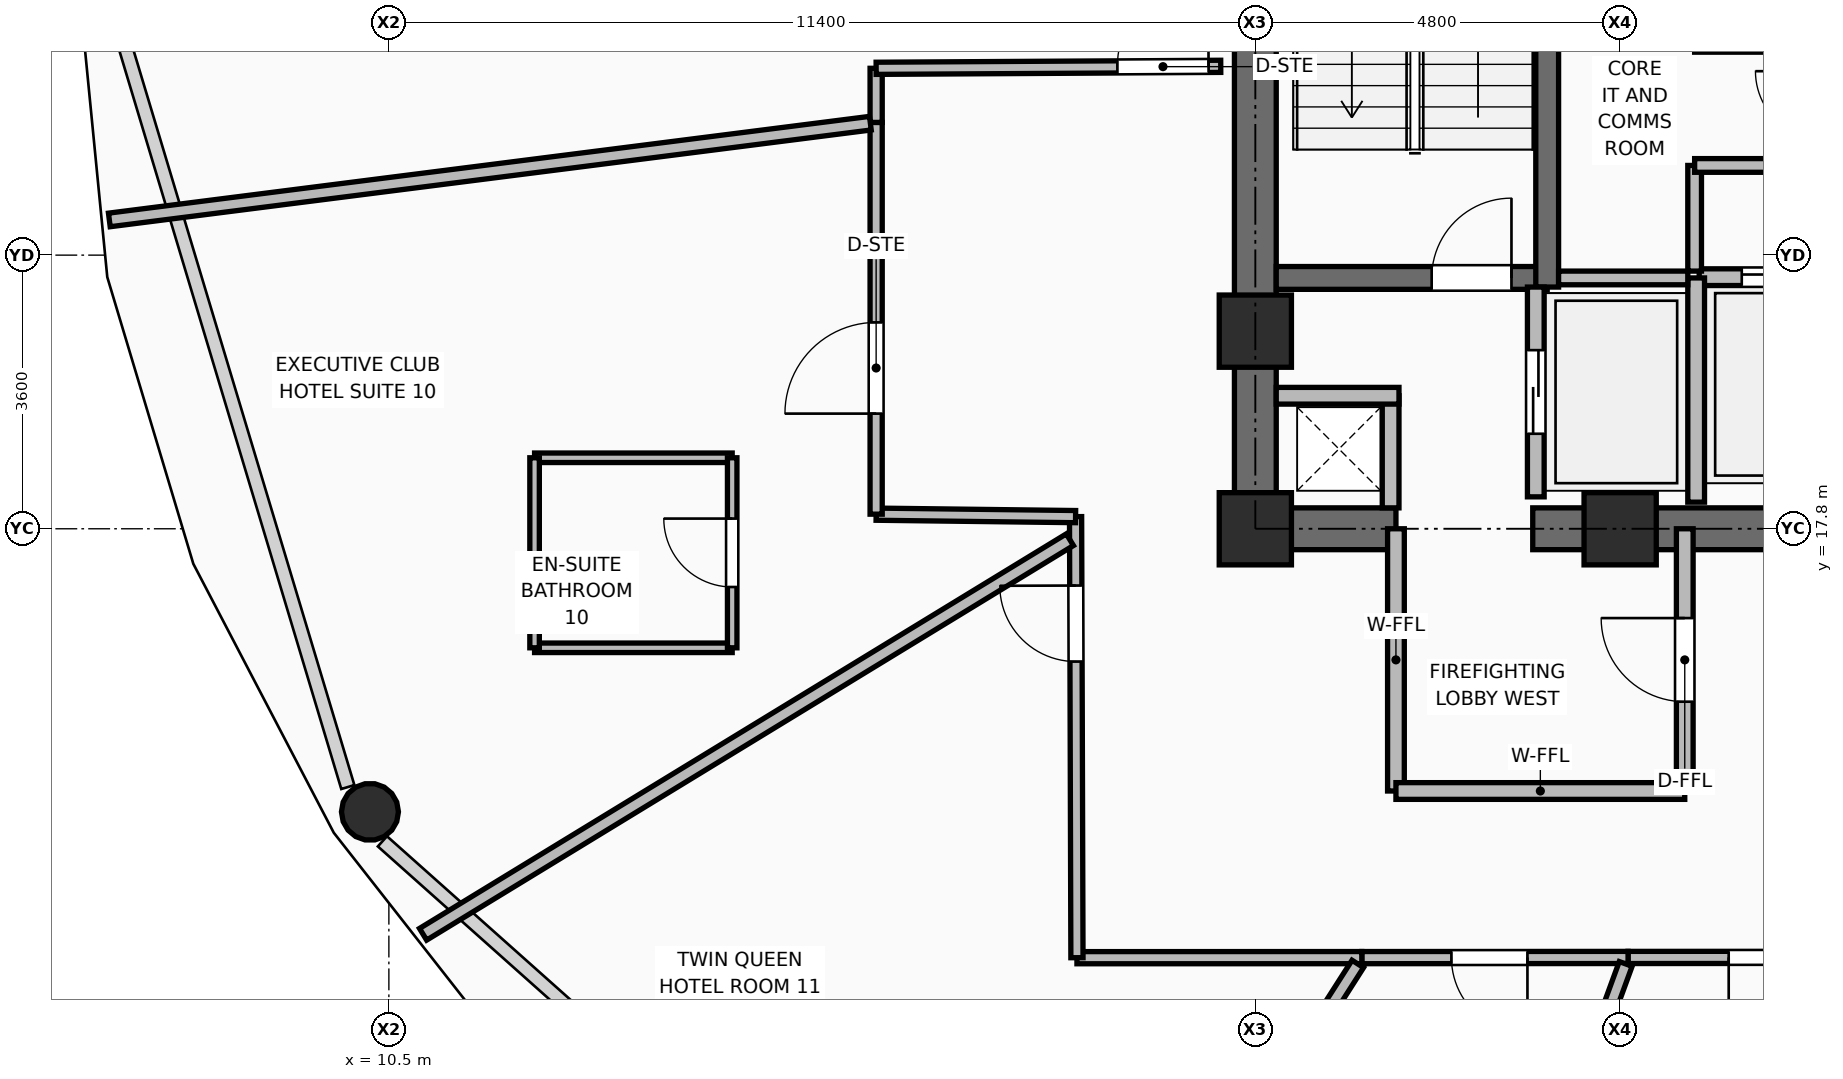
"""IFC4 building model, lengths in metres.
Left out: names, types, materials, properties, quantities, classifications, styles, units other than length and angle.
Written with IfcOpenShell. Run it as: python <this file> out.ifc"""

import sys

from ifc_helpers import new_model, si_unit, direction, frame, frame_2d, origin, origin_2d, place, context, subcontext, project, spatial, rectangle, hollow_circle, extrude, element, fill, save


model = new_model("IFC4")
c1 = context("Model", 3, precision=1e-05, world=origin(), true_north=direction((0.0, 1.0)))
c2 = subcontext(c1, "Body", "Model", "MODEL_VIEW")
j1 = project(units=[si_unit("LENGTHUNIT", "METRE"), si_unit("PLANEANGLEUNIT", "RADIAN")], contexts=[c1])
p1 = place(None, origin())
s1 = spatial("IfcSite", under=j1, at=p1, CompositionType="ELEMENT")
p2 = place(p1, origin())
s2 = spatial("IfcBuilding", under=s1, at=p2, CompositionType="ELEMENT")
p3 = place(p2, frame((0.0, 0.0, 172.2)))
s3 = spatial("IfcBuildingStorey", under=s2, at=p3, CompositionType="ELEMENT", Elevation=172.2)
for number, where, z_axis, x_axis in (
    (1, (21.9, 17.8, 0.0), (0.0, 0.0, 1.0), (1.0, 0.0, 0.0)),
    (2, (26.7, 17.8, 0.0), (0.0, 0.0, 1.0), (1.0, 0.0, 0.0)),
    (3, (21.9, 20.4, 0.0), (0.0, 0.0, 1.0), (1.0, 0.0, 0.0)),
):
    element("IfcColumn", number, at=place(p3, frame(where, z_axis=z_axis, x_axis=x_axis)), inside=s3, PredefinedType="COLUMN", context=c2, shape_type="SweptSolid", body=[
        extrude(rectangle(XDim=0.95, YDim=0.95, at=origin_2d()), origin(), (0.0, 0.0, 1.0), 3.75),
    ])
p4 = place(p3, frame((10.251, 14.076, 0.0), z_axis=(0.045976334235, 0.023684778242, 0.998661708473), x_axis=(-0.457956589674, 0.888974556427, 0.0)))
e4 = element("IfcColumn", 4, at=p4, inside=s3, PredefinedType="COLUMN", context=c2, shape_type="SweptSolid", body=[
    extrude(hollow_circle(Radius=0.375, WallThickness=0.035, at=origin_2d()), origin(), (0.0, 0.0, 1.0), 3.505),
])
p5 = place(p3, frame((21.625, 17.8, 0.0), z_axis=(0.0, 0.0, 1.0), x_axis=(1.0, 0.0, 0.0)))
e5 = element("IfcWall", 5, at=p5, inside=s3, PredefinedType="SHEAR", context=c2, shape_type="SweptSolid", body=[
    extrude(rectangle(XDim=2.125, YDim=0.55, at=frame_2d((1.062, 0.0))), origin(), (0.0, 0.0, 1.0), 3.5),
])
p6 = place(p3, frame((25.55, 17.8, 0.0), z_axis=(0.0, 0.0, 1.0), x_axis=(1.0, 0.0, 0.0)))
e6 = element("IfcWall", 6, at=p6, inside=s3, PredefinedType="SHEAR", context=c2, shape_type="SweptSolid", body=[
    extrude(rectangle(XDim=6.9, YDim=0.55, at=frame_2d((3.45, 0.0))), origin(), (0.0, 0.0, 1.0), 3.5),
])
p7 = place(p3, frame((21.9, 18.075, 0.0), z_axis=(0.0, 0.0, 1.0), x_axis=(0.0, 1.0, 0.0)))
e7 = element("IfcWall", 7, at=p7, inside=s3, PredefinedType="SHEAR", context=c2, shape_type="SweptSolid", body=[
    extrude(rectangle(XDim=14.1, YDim=0.55, at=frame_2d((7.05, 0.0))), origin(), (0.0, 0.0, 1.0), 3.5),
])
p8 = place(p3, frame((22.175, 21.1, 0.0), z_axis=(0.0, 0.0, 1.0), x_axis=(1.0, 0.0, 0.0)))
e8 = element("IfcWall", 8, at=p8, inside=s3, PredefinedType="SHEAR", context=c2, shape_type="SweptSolid", body=[
    extrude(rectangle(XDim=3.565, YDim=0.3, at=frame_2d((1.782, 0.0))), origin(), (0.0, 0.0, 1.0), 3.5),
])
p9 = place(p8, frame((2.045, 0.0, 0.0)))
e9 = element("IfcOpeningElement", 9, at=p9, cuts=e8, PredefinedType="OPENING", context=c2, shape_type="SweptSolid", body=[
    extrude(rectangle(XDim=1.05, YDim=2.1, at=frame_2d((0.525, 1.05))), frame((0.0, 0.16, 0.0), z_axis=(0.0, -1.0, 0.0), x_axis=(1.0, 0.0, 0.0)), (0.0, 0.0, 1.0), 0.32),
])
p10 = place(p3, frame((25.74, 20.98, 0.0), z_axis=(0.0, 0.0, 1.0), x_axis=(0.0, 1.0, 0.0)))
e10 = element("IfcWall", 10, at=p10, inside=s3, PredefinedType="SHEAR", context=c2, shape_type="SweptSolid", body=[
    extrude(rectangle(XDim=7.99, YDim=0.3, at=frame_2d((3.995, 0.0))), origin(), (0.0, 0.0, 1.0), 3.5),
])
p11 = place(p3, frame((23.68, 18.075, 0.0), z_axis=(0.0, 0.0, 1.0), x_axis=(0.0, 1.0, 0.0)))
e11 = element("IfcWall", 11, at=p11, inside=s3, PredefinedType="PARTITIONING", context=c2, shape_type="SweptSolid", body=[
    extrude(rectangle(XDim=1.475, YDim=0.22, at=frame_2d((0.738, 0.0))), origin(), (0.0, 0.0, 1.0), 3.48),
])
p12 = place(p3, frame((22.175, 19.55, 0.0), z_axis=(0.0, 0.0, 1.0), x_axis=(1.0, 0.0, 0.0)))
e12 = element("IfcWall", 12, at=p12, inside=s3, PredefinedType="PARTITIONING", context=c2, shape_type="SweptSolid", body=[
    extrude(rectangle(XDim=1.615, YDim=0.22, at=frame_2d((0.808, 0.0))), origin(), (0.0, 0.0, 1.0), 2.525),
])
p13 = place(p3, frame((25.59, 18.22, 0.0), z_axis=(0.0, 0.0, 1.0), x_axis=(0.0, 1.0, 0.0)))
e13 = element("IfcWall", 13, at=p13, inside=s3, PredefinedType="PARTITIONING", context=c2, shape_type="SweptSolid", body=[
    extrude(rectangle(XDim=2.76, YDim=0.22, at=frame_2d((1.38, 0.0))), origin(), (0.0, 0.0, 1.0), 3.48),
])
p14 = place(p13, frame((0.83, 0.0, 0.0)))
e14 = element("IfcOpeningElement", 14, at=p14, cuts=e13, PredefinedType="OPENING", context=c2, shape_type="SweptSolid", body=[
    extrude(rectangle(XDim=1.1, YDim=2.2, at=frame_2d((0.55, 1.1))), frame((0.0, 0.12, 0.0), z_axis=(0.0, -1.0, 0.0), x_axis=(1.0, 0.0, 0.0)), (0.0, 0.0, 1.0), 0.24),
])
p15 = place(p3, frame((27.74, 21.11, 0.0), z_axis=(0.0, 0.0, 1.0), x_axis=(1.0, 0.0, 0.0)))
e15 = element("IfcWall", 15, at=p15, inside=s3, PredefinedType="PARTITIONING", context=c2, shape_type="SweptSolid", body=[
    extrude(rectangle(XDim=2.22, YDim=0.22, at=frame_2d((1.11, 0.0))), origin(), (0.0, 0.0, 1.0), 3.48),
])
p16 = place(p15, frame((0.56, 0.0, 0.0)))
e16 = element("IfcOpeningElement", 16, at=p16, cuts=e15, PredefinedType="OPENING", context=c2, shape_type="SweptSolid", body=[
    extrude(rectangle(XDim=1.1, YDim=2.2, at=frame_2d((0.55, 1.1))), frame((0.0, 0.12, 0.0), z_axis=(0.0, -1.0, 0.0), x_axis=(1.0, 0.0, 0.0)), (0.0, 0.0, 1.0), 0.24),
])
p17 = place(p3, frame((27.7, 18.15, 0.0), z_axis=(0.0, 0.0, 1.0), x_axis=(0.0, 1.0, 0.0)))
e17 = element("IfcWall", 17, at=p17, inside=s3, PredefinedType="PARTITIONING", context=c2, shape_type="SweptSolid", body=[
    extrude(rectangle(XDim=2.95, YDim=0.22, at=frame_2d((1.475, 0.0))), origin(), (0.0, 0.0, 1.0), 3.48),
])
p18 = place(p3, frame((25.89, 21.1, 0.0), z_axis=(0.0, 0.0, 1.0), x_axis=(1.0, 0.0, 0.0)))
e18 = element("IfcWall", 18, at=p18, inside=s3, PredefinedType="PARTITIONING", context=c2, shape_type="SweptSolid", body=[
    extrude(rectangle(XDim=1.7, YDim=0.18, at=frame_2d((0.85, 0.0))), origin(), (0.0, 0.0, 1.0), 3.48),
])
p19 = place(p3, frame((27.68, 21.19, 0.0), z_axis=(0.0, 0.0, 1.0), x_axis=(0.0, 1.0, 0.0)))
e19 = element("IfcWall", 19, at=p19, inside=s3, PredefinedType="PARTITIONING", context=c2, shape_type="SweptSolid", body=[
    extrude(rectangle(XDim=1.39, YDim=0.18, at=frame_2d((0.695, 0.0))), origin(), (0.0, 0.0, 1.0), 3.48),
])
p20 = place(p3, frame((27.68, 22.58, 0.0), z_axis=(0.0, 0.0, 1.0), x_axis=(1.0, 0.0, 0.0)))
e20 = element("IfcWall", 20, at=p20, inside=s3, PredefinedType="PARTITIONING", context=c2, shape_type="SweptSolid", body=[
    extrude(rectangle(XDim=1.7, YDim=0.18, at=frame_2d((0.85, 0.0))), origin(), (0.0, 0.0, 1.0), 3.48),
])
p21 = place(p3, frame((23.75, 14.35, 0.0), z_axis=(0.0, 0.0, 1.0), x_axis=(0.0, 1.0, 0.0)))
e21 = element("IfcWall", 21, at=p21, inside=s3, PredefinedType="PARTITIONING", context=c2, shape_type="SweptSolid", body=[
    extrude(rectangle(XDim=3.45, YDim=0.22, at=frame_2d((1.725, 0.0))), origin(), (0.0, 0.0, 1.0), 2.936),
])
p22 = place(p3, frame((23.75, 14.35, 0.0), z_axis=(0.0, 0.0, 1.0), x_axis=(1.0, 0.0, 0.0)))
e22 = element("IfcWall", 22, at=p22, inside=s3, PredefinedType="PARTITIONING", context=c2, shape_type="SweptSolid", body=[
    extrude(rectangle(XDim=3.8, YDim=0.22, at=frame_2d((1.9, 0.0))), origin(), (0.0, 0.0, 1.0), 3.48),
])
p23 = place(p3, frame((27.55, 14.35, 0.0), z_axis=(0.0, 0.0, 1.0), x_axis=(0.0, 1.0, 0.0)))
e23 = element("IfcWall", 23, at=p23, inside=s3, PredefinedType="PARTITIONING", context=c2, shape_type="SweptSolid", body=[
    extrude(rectangle(XDim=3.45, YDim=0.22, at=frame_2d((1.725, 0.0))), origin(), (0.0, 0.0, 1.0), 2.936),
])
p24 = place(p23, frame((1.175, 0.0, 0.0)))
e24 = element("IfcOpeningElement", 24, at=p24, cuts=e23, PredefinedType="OPENING", context=c2, shape_type="SweptSolid", body=[
    extrude(rectangle(XDim=1.1, YDim=2.1, at=frame_2d((0.55, 1.05))), frame((0.0, 0.12, 0.0), z_axis=(0.0, -1.0, 0.0), x_axis=(1.0, 0.0, 0.0)), (0.0, 0.0, 1.0), 0.24),
])
p25 = place(p3, frame((30.507, 12.162, 0.0), z_axis=(0.0, 0.0, 1.0), x_axis=(-0.999999823965, -0.000593354326, 0.0)))
e25 = element("IfcWall", 25, at=p25, inside=s3, PredefinedType="PARTITIONING", context=c2, shape_type="SweptSolid", body=[
    extrude(rectangle(XDim=3.703, YDim=0.16, at=frame_2d((1.852, 0.0))), origin(), (0.0, 0.0, 1.0), 3.48),
])
p26 = place(p25, frame((1.179, 0.0, 0.0)))
e26 = element("IfcOpeningElement", 26, at=p26, cuts=e25, PredefinedType="OPENING", context=c2, shape_type="SweptSolid", body=[
    extrude(rectangle(XDim=1.2, YDim=2.1, at=frame_2d((0.6, 1.05))), frame((0.0, 0.09, 0.0), z_axis=(0.0, -1.0, 0.0), x_axis=(1.0, 0.0, 0.0)), (0.0, 0.0, 1.0), 0.18),
])
p27 = place(p3, frame((26.804, 12.16, 0.0), z_axis=(0.0, 0.0, 1.0), x_axis=(-0.999999844558, -0.000557568912, 0.0)))
e27 = element("IfcWall", 27, at=p27, inside=s3, PredefinedType="PARTITIONING", context=c2, shape_type="SweptSolid", body=[
    extrude(rectangle(XDim=3.503, YDim=0.16, at=frame_2d((1.751, 0.0))), origin(), (0.0, 0.0, 1.0), 3.48),
])
p28 = place(p27, frame((1.324, 0.0, 0.0)))
e28 = element("IfcOpeningElement", 28, at=p28, cuts=e27, PredefinedType="OPENING", context=c2, shape_type="SweptSolid", body=[
    extrude(rectangle(XDim=1.0, YDim=2.1, at=frame_2d((0.5, 1.05))), frame((0.0, 0.09, 0.0), z_axis=(0.0, -1.0, 0.0), x_axis=(1.0, 0.0, 0.0)), (0.0, 0.0, 1.0), 0.18),
])
p29 = place(p3, frame((23.301, 12.158, 0.0), z_axis=(0.0, 0.0, 1.0), x_axis=(-0.999999966056, -0.000260552362, 0.0)))
e29 = element("IfcWall", 29, at=p29, inside=s3, PredefinedType="PARTITIONING", context=c2, shape_type="SweptSolid", body=[
    extrude(rectangle(XDim=3.748, YDim=0.16, at=frame_2d((1.874, 0.0))), origin(), (0.0, 0.0, 1.0), 2.936),
])
p30 = place(p3, frame((19.553, 12.157, 0.0), z_axis=(0.0, 0.0, 1.0), x_axis=(-0.003113283747, 0.99999515372, 0.0)))
e30 = element("IfcWall", 30, at=p30, inside=s3, PredefinedType="PARTITIONING", context=c2, shape_type="SweptSolid", body=[
    extrude(rectangle(XDim=5.803, YDim=0.16, at=frame_2d((2.901, 0.0))), origin(), (0.0, 0.0, 1.0), 2.936),
])
p31 = place(p30, frame((3.896, 0.0, 0.0)))
e31 = element("IfcOpeningElement", 31, at=p31, cuts=e30, PredefinedType="OPENING", context=c2, shape_type="SweptSolid", body=[
    extrude(rectangle(XDim=1.0, YDim=2.1, at=frame_2d((0.5, 1.05))), frame((0.0, 0.09, 0.0), z_axis=(0.0, -1.0, 0.0), x_axis=(1.0, 0.0, 0.0)), (0.0, 0.0, 1.0), 0.18),
])
p32 = place(p3, frame((19.535, 17.96, 0.0), z_axis=(0.0, 0.0, 1.0), x_axis=(-0.999925730774, 0.012187408888, 0.0)))
e32 = element("IfcWall", 32, at=p32, inside=s3, PredefinedType="PARTITIONING", context=c2, shape_type="SweptSolid", body=[
    extrude(rectangle(XDim=2.624, YDim=0.16, at=frame_2d((1.312, 0.0))), origin(), (0.0, 0.0, 1.0), 3.48),
])
p33 = place(p3, frame((16.911, 17.992, 0.0), z_axis=(0.0, 0.0, 1.0), x_axis=(0.0, 1.0, 0.0)))
e33 = element("IfcWall", 33, at=p33, inside=s3, PredefinedType="PARTITIONING", context=c2, shape_type="SweptSolid", body=[
    extrude(rectangle(XDim=5.154, YDim=0.16, at=frame_2d((2.577, 0.0))), origin(), (0.0, 0.0, 1.0), 2.936),
])
p34 = place(p33, frame((1.323, 0.0, 0.0)))
e34 = element("IfcOpeningElement", 34, at=p34, cuts=e33, PredefinedType="OPENING", context=c2, shape_type="SweptSolid", body=[
    extrude(rectangle(XDim=1.2, YDim=2.1, at=frame_2d((0.6, 1.05))), frame((0.0, 0.09, 0.0), z_axis=(0.0, -1.0, 0.0), x_axis=(1.0, 0.0, 0.0)), (0.0, 0.0, 1.0), 0.18),
])
p35 = place(p3, frame((16.911, 23.146, 0.0), z_axis=(0.0, 0.0, 1.0), x_axis=(0.0, 1.0, 0.0)))
e35 = element("IfcWall", 35, at=p35, inside=s3, PredefinedType="PARTITIONING", context=c2, shape_type="SweptSolid", body=[
    extrude(rectangle(XDim=0.712, YDim=0.16, at=frame_2d((0.356, 0.0))), origin(), (0.0, 0.0, 1.0), 3.48),
])
p36 = place(p3, frame((16.911, 23.858, 0.0), z_axis=(0.0, 0.0, 1.0), x_axis=(0.999983403772, 0.005761265572, 0.0)))
e36 = element("IfcWall", 36, at=p36, inside=s3, PredefinedType="PARTITIONING", context=c2, shape_type="SweptSolid", body=[
    extrude(rectangle(XDim=4.534, YDim=0.16, at=frame_2d((2.267, 0.0))), origin(), (0.0, 0.0, 1.0), 2.525),
])
p37 = place(p36, frame((3.174, 0.0, 0.0)))
e37 = element("IfcOpeningElement", 37, at=p37, cuts=e36, PredefinedType="OPENING", context=c2, shape_type="SweptSolid", body=[
    extrude(rectangle(XDim=1.2, YDim=2.1, at=frame_2d((0.6, 1.05))), frame((0.0, 0.09, 0.0), z_axis=(0.0, -1.0, 0.0), x_axis=(1.0, 0.0, 0.0)), (0.0, 0.0, 1.0), 0.18),
])
p38 = place(p3, frame((16.835, 23.136, 0.0), z_axis=(0.0, 0.0, 1.0), x_axis=(-0.992015582563, -0.126115359703, 0.0)))
e38 = element("IfcWall", 38, at=p38, inside=s3, PredefinedType="PARTITIONING", context=c2, shape_type="SweptSolid", body=[
    extrude(rectangle(XDim=10.094, YDim=0.18, at=frame_2d((5.047, 0.0))), origin(), (0.0, 0.0, 1.0), 2.783),
])
p39 = place(p3, frame((19.46, 17.656, 0.0), z_axis=(0.0, 0.0, 1.0), x_axis=(-0.853711993856, -0.520745457537, 0.0)))
e39 = element("IfcWall", 39, at=p39, inside=s3, PredefinedType="PARTITIONING", context=c2, shape_type="SweptSolid", body=[
    extrude(rectangle(XDim=9.968, YDim=0.18, at=frame_2d((4.984, 0.0))), origin(), (0.0, 0.0, 1.0), 2.783),
])
p40 = place(p3, frame((23.248, 12.075, 0.0), z_axis=(0.0, 0.0, 1.0), x_axis=(-0.538138353418, -0.84285651957, 0.0)))
e40 = element("IfcWall", 40, at=p40, inside=s3, PredefinedType="PARTITIONING", context=c2, shape_type="SweptSolid", body=[
    extrude(rectangle(XDim=7.639, YDim=0.18, at=frame_2d((3.82, 0.0))), origin(), (0.0, 0.0, 1.0), 2.783),
])
p41 = place(p3, frame((26.773, 12.075, 0.0), z_axis=(0.0, 0.0, 1.0), x_axis=(-0.343462150778, -0.939166519305, 0.0)))
e41 = element("IfcWall", 41, at=p41, inside=s3, PredefinedType="PARTITIONING", context=c2, shape_type="SweptSolid", body=[
    extrude(rectangle(XDim=8.754, YDim=0.18, at=frame_2d((4.377, 0.0))), origin(), (0.0, 0.0, 1.0), 2.783),
])
for number, where, z_axis, x_axis in (
    (42, (12.417, 16.234, 0.0), (0.0, 0.0, 1.0), (1.0, 0.0, 0.0)),
    (43, (12.417, 18.734, 0.0), (0.0, 0.0, 1.0), (1.0, 0.0, 0.0)),
):
    element("IfcWall", number, at=place(p3, frame(where, z_axis=z_axis, x_axis=x_axis)), inside=s3, PredefinedType="PARTITIONING", context=c2, shape_type="SweptSolid", body=[
        extrude(rectangle(XDim=2.6, YDim=0.125, at=frame_2d((1.3, 0.0))), origin(), (0.0, 0.0, 1.0), 3.48),
    ])
p42 = place(p3, frame((12.417, 16.234, 0.0), z_axis=(0.0, 0.0, 1.0), x_axis=(0.0, 1.0, 0.0)))
e44 = element("IfcWall", 44, at=p42, inside=s3, PredefinedType="PARTITIONING", context=c2, shape_type="SweptSolid", body=[
    extrude(rectangle(XDim=2.5, YDim=0.125, at=frame_2d((1.25, 0.0))), origin(), (0.0, 0.0, 1.0), 3.48),
])
p43 = place(p3, frame((15.017, 16.234, 0.0), z_axis=(0.0, 0.0, 1.0), x_axis=(0.0, 1.0, 0.0)))
e45 = element("IfcWall", 45, at=p43, inside=s3, PredefinedType="PARTITIONING", context=c2, shape_type="SweptSolid", body=[
    extrude(rectangle(XDim=2.5, YDim=0.125, at=frame_2d((1.25, 0.0))), origin(), (0.0, 0.0, 1.0), 3.48),
])
p44 = place(p43, frame((0.8, 0.0, 0.0)))
e46 = element("IfcOpeningElement", 46, at=p44, cuts=e45, PredefinedType="OPENING", context=c2, shape_type="SweptSolid", body=[
    extrude(rectangle(XDim=0.9, YDim=2.1, at=frame_2d((0.45, 1.05))), frame((0.0, 0.073, 0.0), z_axis=(0.0, -1.0, 0.0), x_axis=(1.0, 0.0, 0.0)), (0.0, 0.0, 1.0), 0.145),
])
p45 = place(p9, origin())
e47 = element("IfcDoor", 47, at=p45, inside=s3, OperationType="SINGLE_SWING_RIGHT", PredefinedType="DOOR", context=c2, shape_type="SweptSolid", body=[
    extrude(rectangle(XDim=1.05, YDim=2.1, at=frame_2d((0.525, 1.05))), frame((0.0, 0.025, 0.0), z_axis=(0.0, -1.0, 0.0), x_axis=(1.0, 0.0, 0.0)), (0.0, 0.0, 1.0), 0.05),
])
fill(e9, e47)
p46 = place(p14, origin())
e48 = element("IfcDoor", 48, at=p46, inside=s3, OperationType="DOUBLE_DOOR_SLIDING", PredefinedType="DOOR", context=c2, shape_type="SweptSolid", body=[
    extrude(rectangle(XDim=1.1, YDim=2.2, at=frame_2d((0.55, 1.1))), frame((0.0, 0.025, 0.0), z_axis=(0.0, -1.0, 0.0), x_axis=(1.0, 0.0, 0.0)), (0.0, 0.0, 1.0), 0.05),
])
fill(e14, e48)
p47 = place(p16, origin())
e49 = element("IfcDoor", 49, at=p47, inside=s3, OperationType="DOUBLE_DOOR_SLIDING", PredefinedType="DOOR", context=c2, shape_type="SweptSolid", body=[
    extrude(rectangle(XDim=1.1, YDim=2.2, at=frame_2d((0.55, 1.1))), frame((0.0, 0.025, 0.0), z_axis=(0.0, -1.0, 0.0), x_axis=(1.0, 0.0, 0.0)), (0.0, 0.0, 1.0), 0.05),
])
fill(e16, e49)
p48 = place(p24, origin())
e50 = element("IfcDoor", 50, at=p48, inside=s3, OperationType="SINGLE_SWING_RIGHT", PredefinedType="DOOR", context=c2, shape_type="SweptSolid", body=[
    extrude(rectangle(XDim=1.1, YDim=2.1, at=frame_2d((0.55, 1.05))), frame((0.0, 0.025, 0.0), z_axis=(0.0, -1.0, 0.0), x_axis=(1.0, 0.0, 0.0)), (0.0, 0.0, 1.0), 0.05),
])
fill(e24, e50)
p49 = place(p37, origin())
e51 = element("IfcDoor", 51, at=p49, inside=s3, OperationType="SINGLE_SWING_RIGHT", PredefinedType="DOOR", context=c2, shape_type="SweptSolid", body=[
    extrude(rectangle(XDim=1.2, YDim=2.1, at=frame_2d((0.6, 1.05))), frame((0.0, 0.025, 0.0), z_axis=(0.0, -1.0, 0.0), x_axis=(1.0, 0.0, 0.0)), (0.0, 0.0, 1.0), 0.05),
])
fill(e37, e51)
p50 = place(p44, origin())
e52 = element("IfcDoor", 52, at=p50, inside=s3, OperationType="SINGLE_SWING_RIGHT", PredefinedType="DOOR", context=c2, shape_type="SweptSolid", body=[
    extrude(rectangle(XDim=0.9, YDim=2.1, at=frame_2d((0.45, 1.05))), frame((0.0, 0.025, 0.0), z_axis=(0.0, -1.0, 0.0), x_axis=(1.0, 0.0, 0.0)), (0.0, 0.0, 1.0), 0.05),
])
fill(e46, e52)
p51 = place(p34, origin())
e53 = element("IfcDoor", 53, at=p51, inside=s3, OperationType="SINGLE_SWING_LEFT", PredefinedType="DOOR", context=c2, shape_type="SweptSolid", body=[
    extrude(rectangle(XDim=1.2, YDim=2.1, at=frame_2d((0.6, 1.05))), frame((0.0, 0.025, 0.0), z_axis=(0.0, -1.0, 0.0), x_axis=(1.0, 0.0, 0.0)), (0.0, 0.0, 1.0), 0.05),
])
fill(e34, e53)
p52 = place(p31, origin())
e54 = element("IfcDoor", 54, at=p52, inside=s3, OperationType="SINGLE_SWING_RIGHT", PredefinedType="DOOR", context=c2, shape_type="SweptSolid", body=[
    extrude(rectangle(XDim=1.0, YDim=2.1, at=frame_2d((0.5, 1.05))), frame((0.0, 0.025, 0.0), z_axis=(0.0, -1.0, 0.0), x_axis=(1.0, 0.0, 0.0)), (0.0, 0.0, 1.0), 0.05),
])
fill(e31, e54)
p53 = place(p28, origin())
e55 = element("IfcDoor", 55, at=p53, inside=s3, OperationType="SINGLE_SWING_LEFT", PredefinedType="DOOR", context=c2, shape_type="SweptSolid", body=[
    extrude(rectangle(XDim=1.0, YDim=2.1, at=frame_2d((0.5, 1.05))), frame((0.0, 0.025, 0.0), z_axis=(0.0, -1.0, 0.0), x_axis=(1.0, 0.0, 0.0)), (0.0, 0.0, 1.0), 0.05),
])
fill(e28, e55)
p54 = place(p26, origin())
e56 = element("IfcDoor", 56, at=p54, inside=s3, OperationType="SINGLE_SWING_RIGHT", PredefinedType="DOOR", context=c2, shape_type="SweptSolid", body=[
    extrude(rectangle(XDim=1.2, YDim=2.1, at=frame_2d((0.6, 1.05))), frame((0.0, 0.025, 0.0), z_axis=(0.0, -1.0, 0.0), x_axis=(1.0, 0.0, 0.0)), (0.0, 0.0, 1.0), 0.05),
])
fill(e26, e56)
save(model, sys.argv[1])
